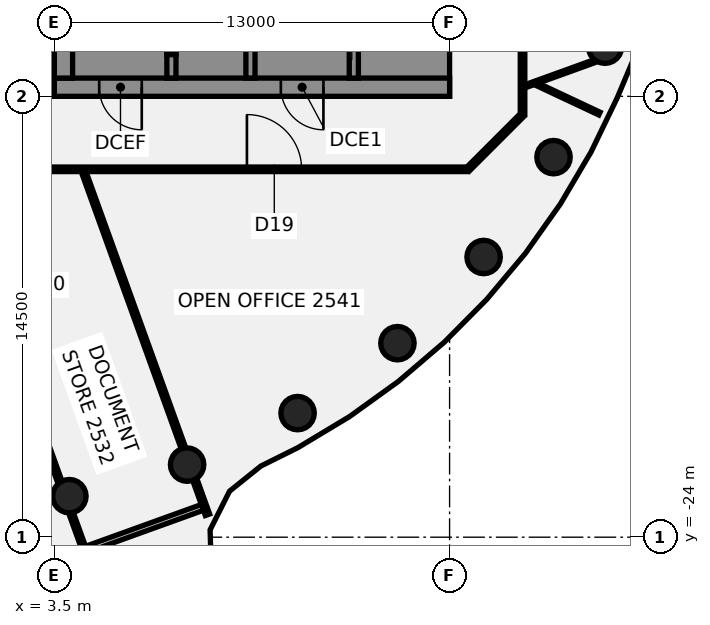
"""IFC4 building model, lengths in metres.
Left out: names, types, materials, properties, quantities, classifications, styles, units other than length and angle.
Written with IfcOpenShell. Run it as: python <this file> out.ifc"""

import sys

from ifc_helpers import new_model, si_unit, direction, frame, frame_2d, origin, origin_2d, place, context, subcontext, project, spatial, polyline, rectangle, circle, outline, extrude, element, fill, save


model = new_model("IFC4")
c1 = context("Model", 3, precision=1e-05, world=origin(), true_north=direction((0.0, 1.0)))
c2 = subcontext(c1, "Body", "Model", "MODEL_VIEW")
j1 = project(units=[si_unit("LENGTHUNIT", "METRE"), si_unit("PLANEANGLEUNIT", "RADIAN")], contexts=[c1])
p1 = place(None, origin())
s1 = spatial("IfcSite", under=j1, at=p1, CompositionType="ELEMENT")
p2 = place(p1, origin())
s2 = spatial("IfcBuilding", under=s1, at=p2, CompositionType="ELEMENT")
p3 = place(p2, frame((0.0, 0.0, 106.0)))
s3 = spatial("IfcBuildingStorey", under=s2, at=p3, CompositionType="ELEMENT", Elevation=106.0)
for number, where, z_axis, x_axis in (
    (1, (3.994, -22.651, -0.14), (0.0, 0.0, 1.0), (1.0, 0.0, 0.0)),
    (2, (7.866, -21.613, -0.14), (0.0, 0.0, 1.0), (1.0, 0.0, 0.0)),
    (3, (11.5, -19.919, -0.14), (0.0, 0.0, 1.0), (1.0, 0.0, 0.0)),
    (4, (14.784, -17.619, -0.14), (0.0, 0.0, 1.0), (1.0, 0.0, 0.0)),
    (5, (17.619, -14.784, -0.14), (0.0, 0.0, 1.0), (1.0, 0.0, 0.0)),
    (6, (19.919, -11.5, -0.14), (0.0, 0.0, 1.0), (1.0, 0.0, 0.0)),
    (7, (21.613, -7.866, -0.14), (0.0, 0.0, 1.0), (1.0, 0.0, 0.0)),
):
    element("IfcColumn", number, at=place(p3, frame(where, z_axis=z_axis, x_axis=x_axis)), inside=s3, PredefinedType="COLUMN", context=c2, shape_type="SweptSolid", body=[
        extrude(circle(Radius=0.55, at=origin_2d()), origin(), (0.0, 0.0, 1.0), 3.75),
    ])
p4 = place(p3, frame((-0.001, -11.985, 0.0), z_axis=(0.0, 0.0, 1.0), x_axis=(0.339584222286, -0.940575651383, 0.0)))
e8 = element("IfcWall", 8, at=p4, inside=s3, PredefinedType="PARTITIONING", context=c2, shape_type="SweptSolid", body=[
    extrude(rectangle(XDim=10.855, YDim=0.15, at=frame_2d((5.428, 0.0))), origin(), (0.0, 0.0, 1.0), 3.01),
])
p5 = place(p4, frame((3.51, 0.0, 0.0)))
e9 = element("IfcOpeningElement", 9, at=p5, cuts=e8, PredefinedType="OPENING", context=c2, shape_type="SweptSolid", body=[
    extrude(rectangle(XDim=0.9, YDim=2.1, at=frame_2d((0.45, 1.05))), frame((0.0, 0.085, 0.0), z_axis=(0.0, -1.0, 0.0), x_axis=(1.0, 0.0, 0.0)), (0.0, 0.0, 1.0), 0.17),
])
p6 = place(p3, frame((4.046, -23.197, 0.0), z_axis=(0.0, 0.0, 1.0), x_axis=(0.339554526874, -0.940586372046, 0.0)))
e10 = element("IfcWall", 10, at=p6, inside=s3, PredefinedType="PARTITIONING", context=c2, shape_type="SweptSolid", body=[
    extrude(rectangle(XDim=1.201, YDim=0.15, at=frame_2d((0.6, 0.0))), origin(), (0.0, 0.0, 1.0), 3.01),
])
p7 = place(p3, frame((4.465, -11.985, 0.0), z_axis=(0.0, 0.0, 1.0), x_axis=(0.33957004788, -0.940580768771, 0.0)))
e11 = element("IfcWall", 11, at=p7, inside=s3, PredefinedType="PARTITIONING", context=c2, shape_type="SweptSolid", body=[
    extrude(rectangle(XDim=9.675, YDim=0.15, at=frame_2d((4.837, 0.0))), origin(), (0.0, 0.0, 1.0), 3.01),
])
p8 = place(p3, frame((8.118, -22.105, 0.0), z_axis=(0.0, 0.0, 1.0), x_axis=(0.339654219986, -0.940550376559, 0.0)))
e12 = element("IfcWall", 12, at=p8, inside=s3, PredefinedType="PARTITIONING", context=c2, shape_type="SweptSolid", body=[
    extrude(rectangle(XDim=1.23, YDim=0.15, at=frame_2d((0.615, 0.0))), origin(), (0.0, 0.0, 1.0), 3.01),
])
p9 = place(p3, frame((19.376, -9.103, 0.0), z_axis=(0.0, 0.0, 1.0), x_axis=(0.905138048733, -0.425117763374, 0.0)))
e13 = element("IfcWall", 13, at=p9, inside=s3, PredefinedType="PARTITIONING", context=c2, shape_type="SweptSolid", body=[
    extrude(rectangle(XDim=2.268, YDim=0.1, at=frame_2d((1.134, 0.0))), origin(), (0.0, 0.0, 1.0), 3.01),
])
p10 = place(p3, frame((-17.1, -11.9, 0.0), z_axis=(0.0, 0.0, 1.0), x_axis=(1.0, 0.0, 0.0)))
e14 = element("IfcWall", 14, at=p10, inside=s3, PredefinedType="PARTITIONING", context=c2, shape_type="SweptSolid", body=[
    extrude(rectangle(XDim=34.165, YDim=0.15, at=frame_2d((17.083, 0.0))), origin(), (0.0, 0.0, 1.0), 3.01),
])
p11 = place(p10, frame((12.539, 0.0, 0.0)))
e15 = element("IfcOpeningElement", 15, at=p11, cuts=e14, PredefinedType="OPENING", context=c2, shape_type="SweptSolid", body=[
    extrude(rectangle(XDim=1.8, YDim=2.1, at=frame_2d((0.9, 1.05))), frame((0.0, 0.085, 0.0), z_axis=(0.0, -1.0, 0.0), x_axis=(1.0, 0.0, 0.0)), (0.0, 0.0, 1.0), 0.17),
])
p12 = place(p10, frame((1.35, 0.0, 0.0)))
e16 = element("IfcOpeningElement", 16, at=p12, cuts=e14, PredefinedType="OPENING", context=c2, shape_type="SweptSolid", body=[
    extrude(rectangle(XDim=1.8, YDim=2.1, at=frame_2d((0.9, 1.05))), frame((0.0, 0.085, 0.0), z_axis=(0.0, -1.0, 0.0), x_axis=(1.0, 0.0, 0.0)), (0.0, 0.0, 1.0), 0.17),
])
p13 = place(p10, frame((26.934, 0.0, 0.0)))
e17 = element("IfcOpeningElement", 17, at=p13, cuts=e14, PredefinedType="OPENING", context=c2, shape_type="SweptSolid", body=[
    extrude(rectangle(XDim=1.8, YDim=2.1, at=frame_2d((0.9, 1.05))), frame((0.0, 0.085, 0.0), z_axis=(0.0, -1.0, 0.0), x_axis=(1.0, 0.0, 0.0)), (0.0, 0.0, 1.0), 0.17),
])
p14 = place(p3, frame((-5.01, -27.849, 0.0), z_axis=(0.0, 0.0, 1.0), x_axis=(0.940612067166, 0.33948334142, 0.0)))
e18 = element("IfcWall", 18, at=p14, inside=s3, PredefinedType="PARTITIONING", context=c2, shape_type="SweptSolid", body=[
    extrude(rectangle(XDim=14.224, YDim=0.2, at=frame_2d((7.112, 0.0))), origin(), (0.0, 0.0, 1.0), 3.01),
])
p15 = place(p14, frame((6.099, 0.0, 0.0)))
e19 = element("IfcOpeningElement", 19, at=p15, cuts=e18, PredefinedType="OPENING", context=c2, shape_type="SweptSolid", body=[
    extrude(rectangle(XDim=1.4, YDim=2.1, at=frame_2d((0.7, 1.05))), frame((0.0, 0.11, 0.0), z_axis=(0.0, -1.0, 0.0), x_axis=(1.0, 0.0, 0.0)), (0.0, 0.0, 1.0), 0.22),
])
p16 = place(p3, frame((18.975, -9.172, 0.0), z_axis=(0.0, 0.0, 1.0), x_axis=(0.94050065274, 0.339791880709, 0.0)))
e20 = element("IfcWall", 20, at=p16, inside=s3, PredefinedType="PARTITIONING", context=c2, shape_type="SweptSolid", body=[
    extrude(rectangle(XDim=2.482, YDim=0.1, at=frame_2d((1.241, 0.0))), origin(), (0.0, 0.0, 1.0), 3.01),
])
p17 = place(p3, frame((17.1, -11.9, 0.0), z_axis=(0.0, 0.0, 1.0), x_axis=(0.707106781187, 0.707106781187, 0.0)))
e21 = element("IfcWall", 21, at=p17, inside=s3, PredefinedType="PARTITIONING", context=c2, shape_type="SweptSolid", body=[
    extrude(rectangle(XDim=2.505, YDim=0.15, at=frame_2d((1.253, 0.0))), origin(), (0.0, 0.0, 1.0), 3.01),
])
p18 = place(p3, frame((18.9, -10.1, 0.0), z_axis=(0.0, 0.0, 1.0), x_axis=(0.0, 1.0, 0.0)))
e22 = element("IfcWall", 22, at=p18, inside=s3, PredefinedType="PARTITIONING", context=c2, shape_type="SweptSolid", body=[
    extrude(rectangle(XDim=20.2, YDim=0.15, at=frame_2d((10.1, 0.0))), origin(), (0.0, 0.0, 1.0), 3.01),
])
p19 = place(p18, frame((8.966, 0.0, 0.0)))
e23 = element("IfcOpeningElement", 23, at=p19, cuts=e22, PredefinedType="OPENING", context=c2, shape_type="SweptSolid", body=[
    extrude(rectangle(XDim=1.8, YDim=2.1, at=frame_2d((0.9, 1.05))), frame((0.0, 0.085, 0.0), z_axis=(0.0, -1.0, 0.0), x_axis=(1.0, 0.0, 0.0)), (0.0, 0.0, 1.0), 0.17),
])
p20 = place(p18, frame((13.796, 0.0, 0.0)))
e24 = element("IfcOpeningElement", 24, at=p20, cuts=e22, PredefinedType="OPENING", context=c2, shape_type="SweptSolid", body=[
    extrude(rectangle(XDim=0.9, YDim=2.1, at=frame_2d((0.45, 1.05))), frame((0.0, 0.085, 0.0), z_axis=(0.0, -1.0, 0.0), x_axis=(1.0, 0.0, 0.0)), (0.0, 0.0, 1.0), 0.17),
])
p21 = place(p3, frame((16.5, -9.2, 0.0), z_axis=(0.0, 0.0, 1.0), x_axis=(-1.0, 0.0, 0.0)))
e25 = element("IfcWall", 25, at=p21, inside=s3, PredefinedType="SHEAR", context=c2, shape_type="SweptSolid", body=[
    extrude(rectangle(XDim=13.0, YDim=0.6, at=frame_2d((6.5, 0.0))), origin(), (0.0, 0.0, 1.0), 3.61),
])
p22 = place(p21, frame((4.15, 0.0, 0.0)))
e26 = element("IfcOpeningElement", 26, at=p22, cuts=e25, PredefinedType="OPENING", context=c2, shape_type="SweptSolid", body=[
    extrude(rectangle(XDim=1.4, YDim=2.1, at=frame_2d((0.7, 1.05))), frame((0.0, 0.31, 0.0), z_axis=(0.0, -1.0, 0.0), x_axis=(1.0, 0.0, 0.0)), (0.0, 0.0, 1.0), 0.62),
])
p23 = place(p21, frame((10.125, 0.0, 0.0)))
e27 = element("IfcOpeningElement", 27, at=p23, cuts=e25, PredefinedType="OPENING", context=c2, shape_type="SweptSolid", body=[
    extrude(rectangle(XDim=1.4, YDim=2.1, at=frame_2d((0.7, 1.05))), frame((0.0, 0.31, 0.0), z_axis=(0.0, -1.0, 0.0), x_axis=(1.0, 0.0, 0.0)), (0.0, 0.0, 1.0), 0.62),
])
p24 = place(p3, origin())
e28 = element("IfcWall", 28, at=p24, inside=s3, PredefinedType="SHEAR", context=c2, shape_type="SweptSolid", body=[
    extrude(outline(polyline([(13.5, -8.9), (15.9, -8.9), (16.5, -8.9), (16.5, 8.9), (15.9, 8.9), (13.5, 8.9), (13.5, 8.125), (15.9, 8.125), (15.9, 5.625), (13.5, 5.625), (13.5, 5.375), (15.9, 5.375), (15.9, 2.875), (13.5, 2.875), (13.5, 2.625), (15.9, 2.625), (15.9, 0.125), (13.5, 0.125), (13.5, -0.125), (15.9, -0.125), (15.9, -2.625), (13.5, -2.625), (13.5, -2.875), (15.9, -2.875), (15.9, -5.375), (13.5, -5.375), (13.5, -5.625), (15.9, -5.625), (15.9, -8.125), (13.5, -8.125), (13.5, -8.9)])), origin(), (0.0, 0.0, 1.0), 3.61),
])
p25 = place(p3, origin())
e29 = element("IfcWall", 29, at=p25, inside=s3, PredefinedType="SHEAR", context=c2, shape_type="SweptSolid", body=[
    extrude(outline(polyline([(7.5, -8.125), (7.5, -8.9), (9.8, -8.9), (9.8, -8.125), (9.8, -5.625), (9.55, -5.625), (9.55, -8.125), (7.5, -8.125)])), origin(), (0.0, 0.0, 1.0), 3.61),
])
p26 = place(p3, frame((7.35, -8.9, 0.0), z_axis=(0.0, 0.0, 1.0), x_axis=(0.0, 1.0, 0.0)))
e30 = element("IfcWall", 30, at=p26, inside=s3, PredefinedType="SHEAR", context=c2, shape_type="SweptSolid", body=[
    extrude(rectangle(XDim=0.775, YDim=0.3, at=frame_2d((0.387, 0.0))), origin(), (0.0, 0.0, 1.0), 3.61),
])
p27 = place(p3, frame((13.35, -8.9, 0.0), z_axis=(0.0, 0.0, 1.0), x_axis=(0.0, 1.0, 0.0)))
e31 = element("IfcWall", 31, at=p27, inside=s3, PredefinedType="SHEAR", context=c2, shape_type="SweptSolid", body=[
    extrude(rectangle(XDim=17.8, YDim=0.3, at=frame_2d((8.9, 0.0))), origin(), (0.0, 0.0, 1.0), 3.61),
])
p28 = place(p27, frame((1.325, 0.0, 0.0)))
e32 = element("IfcOpeningElement", 32, at=p28, cuts=e31, PredefinedType="OPENING", context=c2, shape_type="SweptSolid", body=[
    extrude(rectangle(XDim=1.4, YDim=2.1, at=frame_2d((0.7, 1.05))), frame((0.0, 0.16, 0.0), z_axis=(0.0, -1.0, 0.0), x_axis=(1.0, 0.0, 0.0)), (0.0, 0.0, 1.0), 0.32),
])
p29 = place(p27, frame((4.225, 0.0, 0.0)))
e33 = element("IfcOpeningElement", 33, at=p29, cuts=e31, PredefinedType="OPENING", context=c2, shape_type="SweptSolid", body=[
    extrude(rectangle(XDim=1.1, YDim=2.1, at=frame_2d((0.55, 1.05))), frame((0.0, 0.16, 0.0), z_axis=(0.0, -1.0, 0.0), x_axis=(1.0, 0.0, 0.0)), (0.0, 0.0, 1.0), 0.32),
])
p30 = place(p27, frame((6.975, 0.0, 0.0)))
e34 = element("IfcOpeningElement", 34, at=p30, cuts=e31, PredefinedType="OPENING", context=c2, shape_type="SweptSolid", body=[
    extrude(rectangle(XDim=1.1, YDim=2.1, at=frame_2d((0.55, 1.05))), frame((0.0, 0.16, 0.0), z_axis=(0.0, -1.0, 0.0), x_axis=(1.0, 0.0, 0.0)), (0.0, 0.0, 1.0), 0.32),
])
p31 = place(p27, frame((9.725, 0.0, 0.0)))
e35 = element("IfcOpeningElement", 35, at=p31, cuts=e31, PredefinedType="OPENING", context=c2, shape_type="SweptSolid", body=[
    extrude(rectangle(XDim=1.1, YDim=2.1, at=frame_2d((0.55, 1.05))), frame((0.0, 0.16, 0.0), z_axis=(0.0, -1.0, 0.0), x_axis=(1.0, 0.0, 0.0)), (0.0, 0.0, 1.0), 0.32),
])
p32 = place(p27, frame((12.475, 0.0, 0.0)))
e36 = element("IfcOpeningElement", 36, at=p32, cuts=e31, PredefinedType="OPENING", context=c2, shape_type="SweptSolid", body=[
    extrude(rectangle(XDim=1.1, YDim=2.1, at=frame_2d((0.55, 1.05))), frame((0.0, 0.16, 0.0), z_axis=(0.0, -1.0, 0.0), x_axis=(1.0, 0.0, 0.0)), (0.0, 0.0, 1.0), 0.32),
])
p33 = place(p3, frame((9.95, -8.9, 0.0), z_axis=(0.0, 0.0, 1.0), x_axis=(0.0, 1.0, 0.0)))
e37 = element("IfcWall", 37, at=p33, inside=s3, PredefinedType="SHEAR", context=c2, shape_type="SweptSolid", body=[
    extrude(rectangle(XDim=17.8, YDim=0.3, at=frame_2d((8.9, 0.0))), origin(), (0.0, 0.0, 1.0), 3.61),
])
p34 = place(p3, frame((7.35, -8.125, 0.0), z_axis=(0.0, 0.0, 1.0), x_axis=(0.0, 1.0, 0.0)))
e38 = element("IfcWall", 38, at=p34, inside=s3, PredefinedType="SHEAR", context=c2, shape_type="SweptSolid", body=[
    extrude(rectangle(XDim=2.5, YDim=0.3, at=frame_2d((1.25, 0.0))), origin(), (0.0, 0.0, 1.0), 3.61),
])
p35 = place(p34, frame((0.7, 0.0, 0.0)))
e39 = element("IfcOpeningElement", 39, at=p35, cuts=e38, PredefinedType="OPENING", context=c2, shape_type="SweptSolid", body=[
    extrude(rectangle(XDim=1.1, YDim=2.1, at=frame_2d((0.55, 1.05))), frame((0.0, 0.16, 0.0), z_axis=(0.0, -1.0, 0.0), x_axis=(1.0, 0.0, 0.0)), (0.0, 0.0, 1.0), 0.32),
])
p36 = place(p3, frame((3.8, -8.9, 0.0), z_axis=(0.0, 0.0, 1.0), x_axis=(0.0, 1.0, 0.0)))
e40 = element("IfcWall", 40, at=p36, inside=s3, PredefinedType="SHEAR", context=c2, shape_type="SweptSolid", body=[
    extrude(rectangle(XDim=17.8, YDim=0.6, at=frame_2d((8.9, 0.0))), origin(), (0.0, 0.0, 1.0), 3.61),
])
p37 = place(p36, frame((1.25, 0.0, 0.0)))
e41 = element("IfcOpeningElement", 41, at=p37, cuts=e40, PredefinedType="OPENING", context=c2, shape_type="SweptSolid", body=[
    extrude(rectangle(XDim=1.8, YDim=2.1, at=frame_2d((0.9, 1.05))), frame((0.0, 0.31, 0.0), z_axis=(0.0, -1.0, 0.0), x_axis=(1.0, 0.0, 0.0)), (0.0, 0.0, 1.0), 0.62),
])
p38 = place(p36, frame((13.8, 0.0, 0.0)))
e42 = element("IfcOpeningElement", 42, at=p38, cuts=e40, PredefinedType="OPENING", context=c2, shape_type="SweptSolid", body=[
    extrude(rectangle(XDim=1.0, YDim=2.1, at=frame_2d((0.5, 1.05))), frame((0.0, 0.31, 0.0), z_axis=(0.0, -1.0, 0.0), x_axis=(1.0, 0.0, 0.0)), (0.0, 0.0, 1.0), 0.62),
])
p39 = place(p13, frame((1.8, 0.0, 0.0), z_axis=(0.0, 0.0, 1.0), x_axis=(-1.0, 0.0, 0.0)))
e43 = element("IfcDoor", 43, at=p39, inside=s3, OperationType="DOUBLE_DOOR_SINGLE_SWING", PredefinedType="DOOR", context=c2, shape_type="SweptSolid", body=[
    extrude(rectangle(XDim=1.8, YDim=2.1, at=frame_2d((0.9, 1.05))), frame((0.0, 0.025, 0.0), z_axis=(0.0, -1.0, 0.0), x_axis=(1.0, 0.0, 0.0)), (0.0, 0.0, 1.0), 0.05),
])
fill(e17, e43)
p40 = place(p22, origin())
e44 = element("IfcDoor", 44, at=p40, inside=s3, OperationType="SINGLE_SWING_LEFT", PredefinedType="DOOR", context=c2, shape_type="SweptSolid", body=[
    extrude(rectangle(XDim=1.4, YDim=2.1, at=frame_2d((0.7, 1.05))), frame((0.0, 0.025, 0.0), z_axis=(0.0, -1.0, 0.0), x_axis=(1.0, 0.0, 0.0)), (0.0, 0.0, 1.0), 0.05),
])
fill(e26, e44)
p41 = place(p23, origin())
e45 = element("IfcDoor", 45, at=p41, inside=s3, OperationType="SINGLE_SWING_LEFT", PredefinedType="DOOR", context=c2, shape_type="SweptSolid", body=[
    extrude(rectangle(XDim=1.4, YDim=2.1, at=frame_2d((0.7, 1.05))), frame((0.0, 0.025, 0.0), z_axis=(0.0, -1.0, 0.0), x_axis=(1.0, 0.0, 0.0)), (0.0, 0.0, 1.0), 0.05),
])
fill(e27, e45)
save(model, sys.argv[1])
